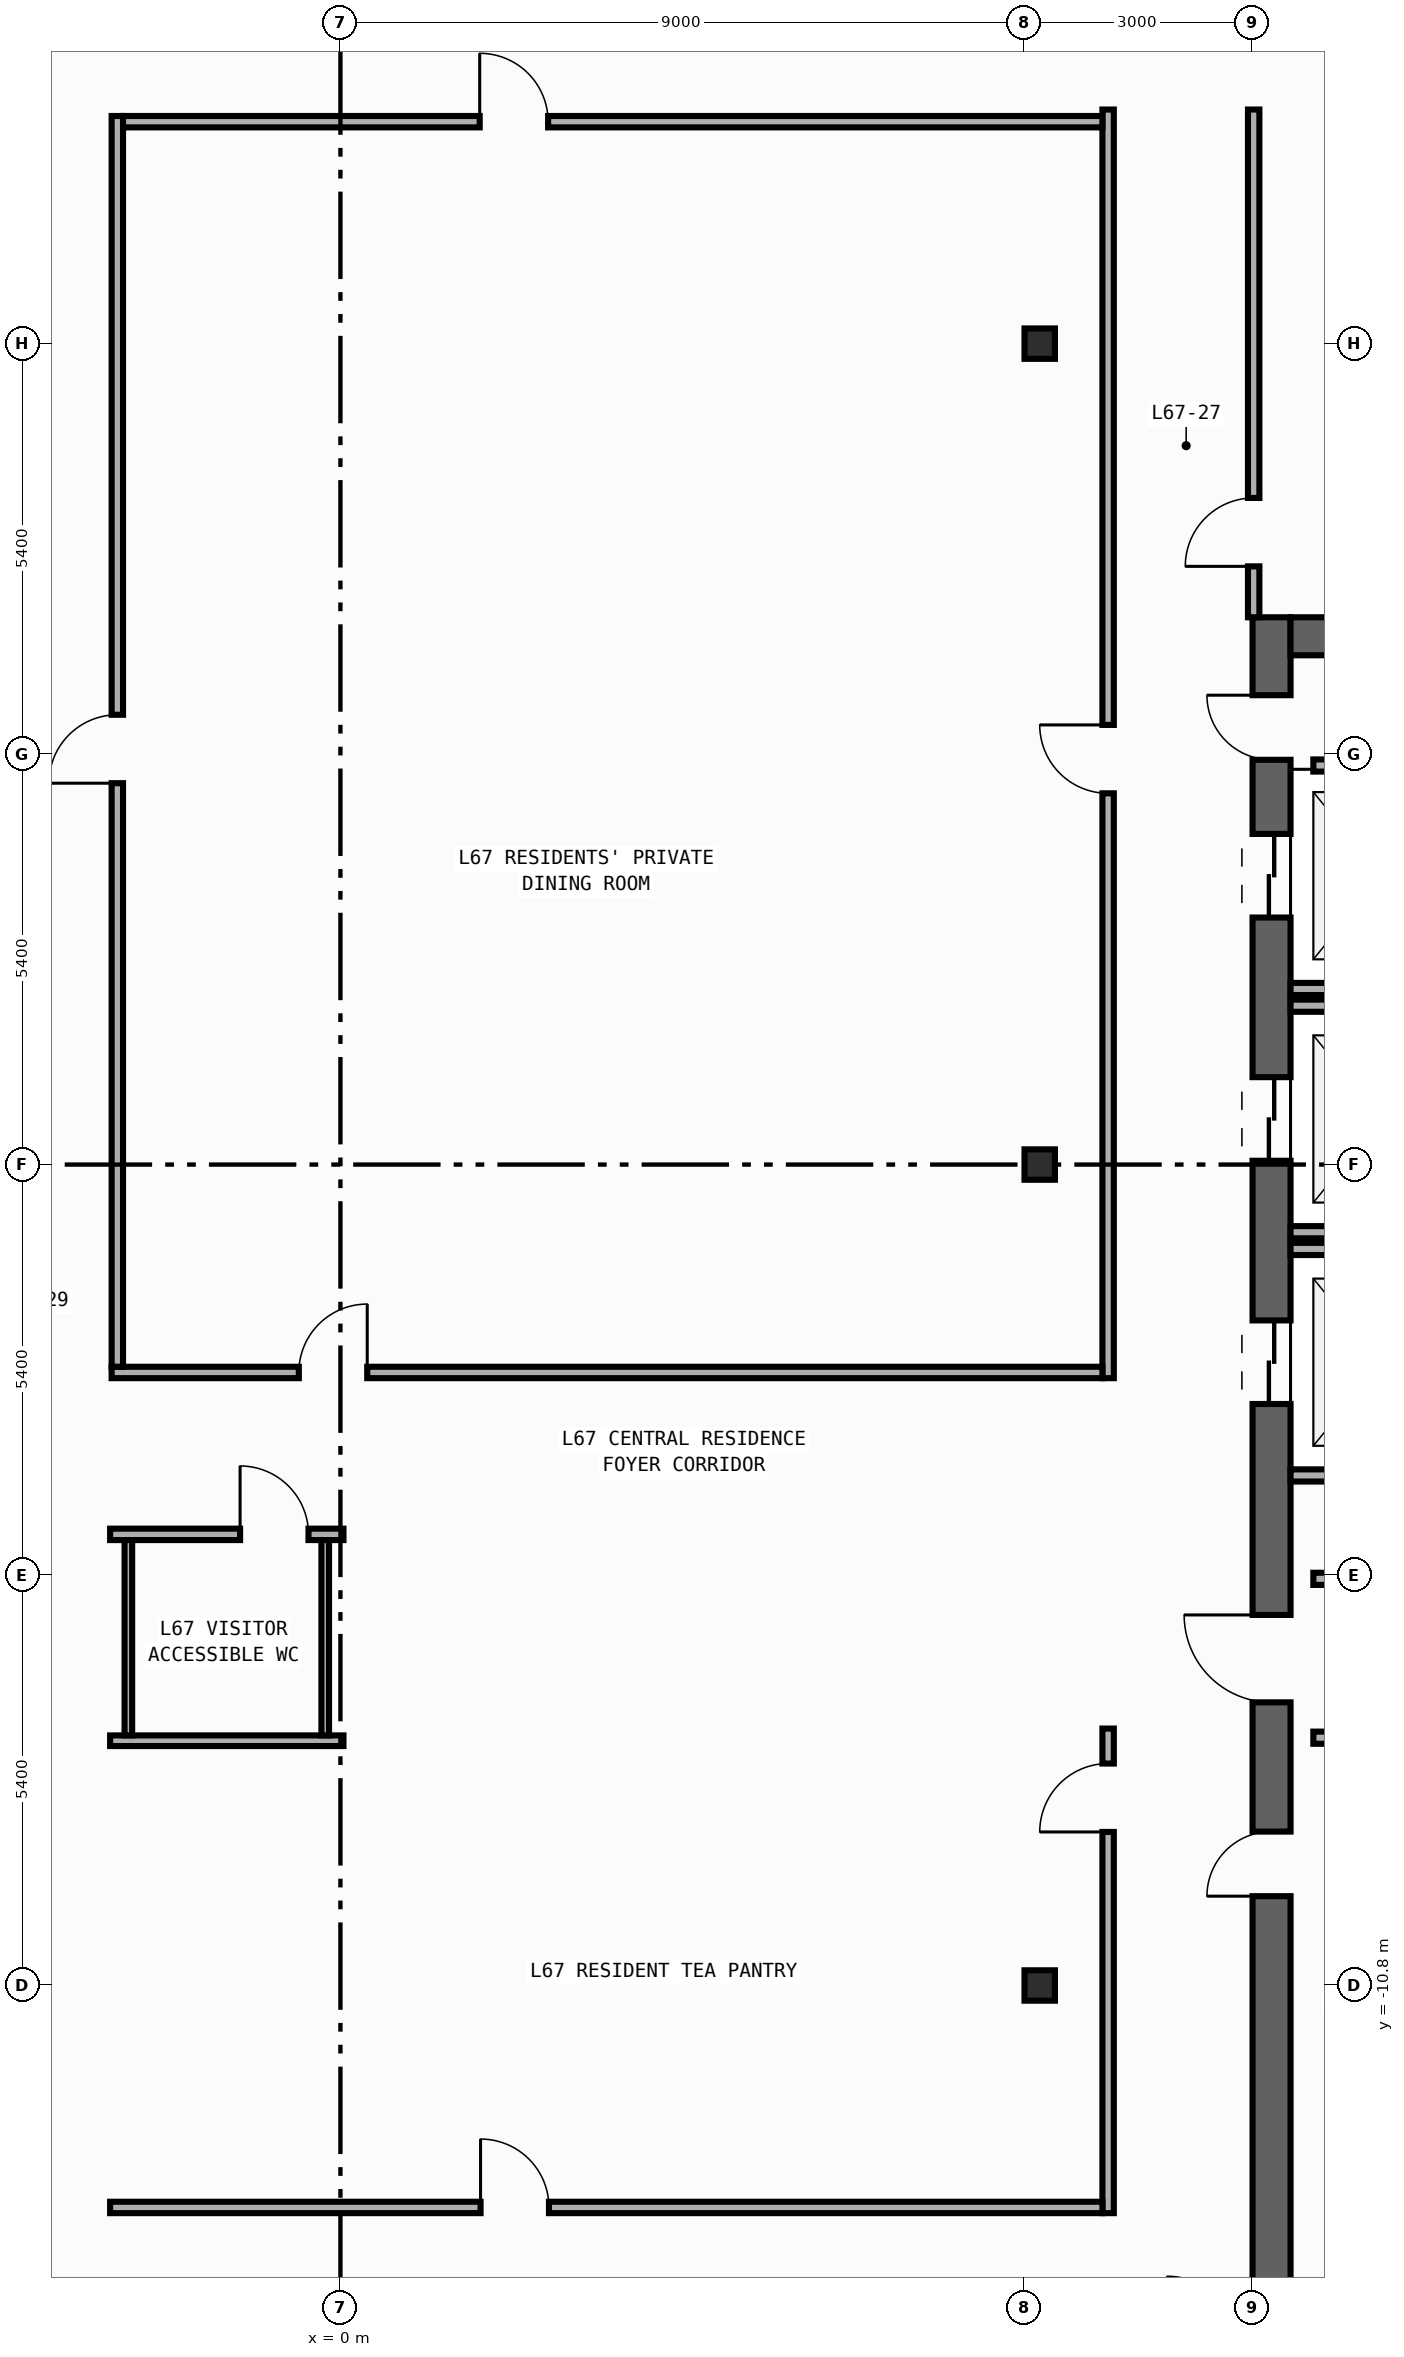
"""IFC4 building model, lengths in metres.
Left out: names, types, materials, properties, quantities, classifications, styles, units other than length and angle.
Written with IfcOpenShell. Run it as: python <this file> out.ifc"""

import sys

from ifc_helpers import new_model, si_unit, direction, frame, frame_2d, origin, origin_2d, place, context, subcontext, project, spatial, rectangle, i_section, extrude, element, fill, save


model = new_model("IFC4")
c1 = context("Model", 3, precision=1e-05, world=origin(), true_north=direction((0.0, 1.0)))
c2 = subcontext(c1, "Body", "Model", "MODEL_VIEW")
j1 = project(units=[si_unit("LENGTHUNIT", "METRE"), si_unit("PLANEANGLEUNIT", "RADIAN")], contexts=[c1])
p1 = place(None, origin())
s1 = spatial("IfcSite", under=j1, at=p1, CompositionType="ELEMENT")
p2 = place(p1, origin())
s2 = spatial("IfcBuilding", under=s1, at=p2, CompositionType="ELEMENT")
p3 = place(p2, frame((0.0, 0.0, 281.4)))
s3 = spatial("IfcBuildingStorey", under=s2, at=p3, CompositionType="ELEMENT", Elevation=281.4)
p4 = place(p3, frame((12.25, -19.8, 0.0), z_axis=(0.0, 0.0, 1.0), x_axis=(0.0, 1.0, 0.0)))
e1 = element("IfcWall", 1, at=p4, inside=s3, PredefinedType="SHEAR", context=c2, shape_type="SweptSolid", body=[
    extrude(rectangle(XDim=27.0, YDim=0.5, at=frame_2d((13.5, 0.0))), origin(), (0.0, 0.0, 1.0), 3.54),
])
p5 = place(p4, frame((23.05, 0.0, 0.0)))
e2 = element("IfcOpeningElement", 2, at=p5, cuts=e1, PredefinedType="OPENING", context=c2, shape_type="SweptSolid", body=[
    extrude(rectangle(XDim=1.1, YDim=2.2, at=frame_2d((0.55, 1.1))), frame((0.0, 0.26, 0.0), z_axis=(0.0, -1.0, 0.0), x_axis=(1.0, 0.0, 0.0)), (0.0, 0.0, 1.0), 0.52),
])
p6 = place(p4, frame((19.85, 0.0, 0.0)))
e3 = element("IfcOpeningElement", 3, at=p6, cuts=e1, PredefinedType="OPENING", context=c2, shape_type="SweptSolid", body=[
    extrude(rectangle(XDim=1.1, YDim=2.2, at=frame_2d((0.55, 1.1))), frame((0.0, 0.26, 0.0), z_axis=(0.0, -1.0, 0.0), x_axis=(1.0, 0.0, 0.0)), (0.0, 0.0, 1.0), 0.52),
])
p7 = place(p4, frame((16.65, 0.0, 0.0)))
e4 = element("IfcOpeningElement", 4, at=p7, cuts=e1, PredefinedType="OPENING", context=c2, shape_type="SweptSolid", body=[
    extrude(rectangle(XDim=1.1, YDim=2.2, at=frame_2d((0.55, 1.1))), frame((0.0, 0.26, 0.0), z_axis=(0.0, -1.0, 0.0), x_axis=(1.0, 0.0, 0.0)), (0.0, 0.0, 1.0), 0.52),
])
p8 = place(p4, frame((10.175, 0.0, 0.0)))
e5 = element("IfcOpeningElement", 5, at=p8, cuts=e1, PredefinedType="OPENING", context=c2, shape_type="SweptSolid", body=[
    extrude(rectangle(XDim=0.85, YDim=2.1, at=frame_2d((0.425, 1.05))), frame((0.0, 0.26, 0.0), z_axis=(0.0, -1.0, 0.0), x_axis=(1.0, 0.0, 0.0)), (0.0, 0.0, 1.0), 0.52),
])
p9 = place(p4, frame((12.725, 0.0, 0.0)))
e6 = element("IfcOpeningElement", 6, at=p9, cuts=e1, PredefinedType="OPENING", context=c2, shape_type="SweptSolid", body=[
    extrude(rectangle(XDim=1.15, YDim=2.2, at=frame_2d((0.575, 1.1))), frame((0.0, 0.26, 0.0), z_axis=(0.0, -1.0, 0.0), x_axis=(1.0, 0.0, 0.0)), (0.0, 0.0, 1.0), 0.52),
])
p10 = place(p4, frame((25.125, 0.0, 0.0)))
e7 = element("IfcOpeningElement", 7, at=p10, cuts=e1, PredefinedType="OPENING", context=c2, shape_type="SweptSolid", body=[
    extrude(rectangle(XDim=0.85, YDim=2.1, at=frame_2d((0.425, 1.05))), frame((0.0, 0.26, 0.0), z_axis=(0.0, -1.0, 0.0), x_axis=(1.0, 0.0, 0.0)), (0.0, 0.0, 1.0), 0.52),
])
p11 = place(p3, frame((12.5, 6.95, 0.0), z_axis=(0.0, 0.0, 1.0), x_axis=(1.0, 0.0, 0.0)))
e8 = element("IfcWall", 8, at=p11, inside=s3, PredefinedType="SHEAR", context=c2, shape_type="SweptSolid", body=[
    extrude(rectangle(XDim=7.4, YDim=0.5, at=frame_2d((3.7, 0.0))), origin(), (0.0, 0.0, 1.0), 3.54),
])
for number, where, z_axis, x_axis in (
    (9, (9.2, -10.8, 0.0), (0.0, 0.0, 1.0), (1.0, 0.0, 0.0)),
    (10, (9.2, 0.0, 0.0), (0.0, 0.0, 1.0), (1.0, 0.0, 0.0)),
    (11, (9.2, 10.8, 0.0), (0.0, 0.0, 1.0), (1.0, 0.0, 0.0)),
):
    element("IfcColumn", number, at=place(p3, frame(where, z_axis=z_axis, x_axis=x_axis)), inside=s3, PredefinedType="COLUMN", context=c2, shape_type="SweptSolid", body=[
        extrude(i_section(OverallWidth=0.4, OverallDepth=0.4, WebThickness=0.013, FlangeThickness=0.021, FilletRadius=0.022, at=origin_2d()), origin(), (0.0, 0.0, 1.0), 3.8),
    ])
for number, where, z_axis, x_axis in (
    (12, (12.5, 2.31, 0.0), (0.0, 0.0, 1.0), (1.0, 0.0, 0.0)),
    (13, (12.5, -0.89, 0.0), (0.0, 0.0, 1.0), (1.0, 0.0, 0.0)),
    (14, (12.5, 2.09, 0.0), (0.0, 0.0, 1.0), (1.0, 0.0, 0.0)),
    (15, (12.5, -4.09, 0.0), (0.0, 0.0, 1.0), (1.0, 0.0, 0.0)),
    (16, (12.5, -1.11, 0.0), (0.0, 0.0, 1.0), (1.0, 0.0, 0.0)),
):
    element("IfcWall", number, at=place(p3, frame(where, z_axis=z_axis, x_axis=x_axis)), inside=s3, PredefinedType="STANDARD", context=c2, shape_type="SweptSolid", body=[
        extrude(rectangle(XDim=2.49, YDim=0.16, at=frame_2d((1.245, 0.0))), origin(), (0.0, 0.0, 1.0), 3.54),
    ])
for number, where, z_axis, x_axis in (
    (17, (12.8, -5.45, 0.0), (0.0, 0.0, 1.0), (1.0, 0.0, 0.0)),
    (18, (12.8, -7.54, 0.0), (0.0, 0.0, 1.0), (1.0, 0.0, 0.0)),
    (19, (12.8, 5.25, 0.0), (0.0, 0.0, 1.0), (1.0, 0.0, 0.0)),
):
    element("IfcWall", number, at=place(p3, frame(where, z_axis=z_axis, x_axis=x_axis)), inside=s3, PredefinedType="STANDARD", context=c2, shape_type="SweptSolid", body=[
        extrude(rectangle(XDim=2.6, YDim=0.16, at=frame_2d((1.3, 0.0))), origin(), (0.0, 0.0, 1.0), 3.54),
    ])
p12 = place(p3, frame((12.015, 7.2, 0.0), z_axis=(0.0, 0.0, 1.0), x_axis=(0.0, 1.0, 0.0)))
e20 = element("IfcWall", 20, at=p12, inside=s3, PredefinedType="PARTITIONING", context=c2, shape_type="SweptSolid", body=[
    extrude(rectangle(XDim=6.68, YDim=0.15, at=frame_2d((3.34, 0.0))), origin(), (0.0, 0.0, 1.0), 3.54),
])
p13 = place(p12, frame((0.67, 0.0, 0.0)))
e21 = element("IfcOpeningElement", 21, at=p13, cuts=e20, PredefinedType="OPENING", context=c2, shape_type="SweptSolid", body=[
    extrude(rectangle(XDim=0.9, YDim=2.15, at=frame_2d((0.45, 1.075))), frame((0.0, 0.085, 0.0), z_axis=(0.0, -1.0, 0.0), x_axis=(1.0, 0.0, 0.0)), (0.0, 0.0, 1.0), 0.17),
])
p14 = place(p3, frame((10.1, -2.81, 0.0), z_axis=(0.0, 0.0, 1.0), x_axis=(0.0, 1.0, 0.0)))
e22 = element("IfcWall", 22, at=p14, inside=s3, PredefinedType="PARTITIONING", context=c2, shape_type="SweptSolid", body=[
    extrude(rectangle(XDim=16.69, YDim=0.15, at=frame_2d((8.345, 0.0))), origin(), (0.0, 0.0, 1.0), 3.54),
])
p15 = place(p14, frame((7.694, 0.0, 0.0)))
e23 = element("IfcOpeningElement", 23, at=p15, cuts=e22, PredefinedType="OPENING", context=c2, shape_type="SweptSolid", body=[
    extrude(rectangle(XDim=0.9, YDim=2.15, at=frame_2d((0.45, 1.075))), frame((0.0, 0.085, 0.0), z_axis=(0.0, -1.0, 0.0), x_axis=(1.0, 0.0, 0.0)), (0.0, 0.0, 1.0), 0.17),
])
p16 = place(p3, frame((10.1, -13.795, 0.0), z_axis=(0.0, 0.0, 1.0), x_axis=(0.0, 1.0, 0.0)))
e24 = element("IfcWall", 24, at=p16, inside=s3, PredefinedType="PARTITIONING", context=c2, shape_type="SweptSolid", body=[
    extrude(rectangle(XDim=6.375, YDim=0.15, at=frame_2d((3.188, 0.0))), origin(), (0.0, 0.0, 1.0), 3.54),
])
p17 = place(p16, frame((5.015, 0.0, 0.0)))
e25 = element("IfcOpeningElement", 25, at=p17, cuts=e24, PredefinedType="OPENING", context=c2, shape_type="SweptSolid", body=[
    extrude(rectangle(XDim=0.9, YDim=2.15, at=frame_2d((0.45, 1.075))), frame((0.0, 0.085, 0.0), z_axis=(0.0, -1.0, 0.0), x_axis=(1.0, 0.0, 0.0)), (0.0, 0.0, 1.0), 0.17),
])
p18 = place(p3, frame((-3.01, -2.735, 0.0), z_axis=(0.0, 0.0, 1.0), x_axis=(1.0, 0.0, 0.0)))
e26 = element("IfcWall", 26, at=p18, inside=s3, PredefinedType="PARTITIONING", context=c2, shape_type="SweptSolid", body=[
    extrude(rectangle(XDim=13.035, YDim=0.15, at=frame_2d((6.518, 0.0))), origin(), (0.0, 0.0, 1.0), 3.54),
])
p19 = place(p18, frame((2.463, 0.0, 0.0)))
e27 = element("IfcOpeningElement", 27, at=p19, cuts=e26, PredefinedType="OPENING", context=c2, shape_type="SweptSolid", body=[
    extrude(rectangle(XDim=0.9, YDim=2.15, at=frame_2d((0.45, 1.075))), frame((0.0, 0.085, 0.0), z_axis=(0.0, -1.0, 0.0), x_axis=(1.0, 0.0, 0.0)), (0.0, 0.0, 1.0), 0.17),
])
p20 = place(p3, frame((-3.03, -4.865, 0.0), z_axis=(0.0, 0.0, 1.0), x_axis=(1.0, 0.0, 0.0)))
e28 = element("IfcWall", 28, at=p20, inside=s3, PredefinedType="PARTITIONING", context=c2, shape_type="SweptSolid", body=[
    extrude(rectangle(XDim=3.07, YDim=0.15, at=frame_2d((1.535, 0.0))), origin(), (0.0, 0.0, 1.0), 3.54),
])
p21 = place(p20, frame((1.71, 0.0, 0.0)))
e29 = element("IfcOpeningElement", 29, at=p21, cuts=e28, PredefinedType="OPENING", context=c2, shape_type="SweptSolid", body=[
    extrude(rectangle(XDim=0.9, YDim=2.15, at=frame_2d((0.45, 1.075))), frame((0.0, 0.085, 0.0), z_axis=(0.0, -1.0, 0.0), x_axis=(1.0, 0.0, 0.0)), (0.0, 0.0, 1.0), 0.17),
])
p22 = place(p3, frame((-2.935, -2.66, 0.0), z_axis=(0.0, 0.0, 1.0), x_axis=(0.0, 1.0, 0.0)))
e30 = element("IfcWall", 30, at=p22, inside=s3, PredefinedType="PARTITIONING", context=c2, shape_type="SweptSolid", body=[
    extrude(rectangle(XDim=16.455, YDim=0.15, at=frame_2d((8.228, 0.0))), origin(), (0.0, 0.0, 1.0), 3.54),
])
p23 = place(p22, frame((7.677, 0.0, 0.0)))
e31 = element("IfcOpeningElement", 31, at=p23, cuts=e30, PredefinedType="OPENING", context=c2, shape_type="SweptSolid", body=[
    extrude(rectangle(XDim=0.9, YDim=2.15, at=frame_2d((0.45, 1.075))), frame((0.0, 0.085, 0.0), z_axis=(0.0, -1.0, 0.0), x_axis=(1.0, 0.0, 0.0)), (0.0, 0.0, 1.0), 0.17),
])
p24 = place(p3, frame((-2.86, 13.72, 0.0), z_axis=(0.0, 0.0, 1.0), x_axis=(1.0, 0.0, 0.0)))
e32 = element("IfcWall", 32, at=p24, inside=s3, PredefinedType="PARTITIONING", context=c2, shape_type="SweptSolid", body=[
    extrude(rectangle(XDim=12.885, YDim=0.15, at=frame_2d((6.442, 0.0))), origin(), (0.0, 0.0, 1.0), 3.54),
])
p25 = place(p24, frame((4.692, 0.0, 0.0)))
e33 = element("IfcOpeningElement", 33, at=p25, cuts=e32, PredefinedType="OPENING", context=c2, shape_type="SweptSolid", body=[
    extrude(rectangle(XDim=0.9, YDim=2.15, at=frame_2d((0.45, 1.075))), frame((0.0, 0.085, 0.0), z_axis=(0.0, -1.0, 0.0), x_axis=(1.0, 0.0, 0.0)), (0.0, 0.0, 1.0), 0.17),
])
p26 = place(p3, frame((-3.03, -13.72, 0.0), z_axis=(0.0, 0.0, 1.0), x_axis=(1.0, 0.0, 0.0)))
e34 = element("IfcWall", 34, at=p26, inside=s3, PredefinedType="PARTITIONING", context=c2, shape_type="SweptSolid", body=[
    extrude(rectangle(XDim=13.055, YDim=0.15, at=frame_2d((6.527, 0.0))), origin(), (0.0, 0.0, 1.0), 3.54),
])
p27 = place(p26, frame((4.874, 0.0, 0.0)))
e35 = element("IfcOpeningElement", 35, at=p27, cuts=e34, PredefinedType="OPENING", context=c2, shape_type="SweptSolid", body=[
    extrude(rectangle(XDim=0.9, YDim=2.15, at=frame_2d((0.45, 1.075))), frame((0.0, 0.085, 0.0), z_axis=(0.0, -1.0, 0.0), x_axis=(1.0, 0.0, 0.0)), (0.0, 0.0, 1.0), 0.17),
])
p28 = place(p3, frame((-3.03, -7.58, 0.0), z_axis=(0.0, 0.0, 1.0), x_axis=(1.0, 0.0, 0.0)))
e36 = element("IfcWall", 36, at=p28, inside=s3, PredefinedType="PARTITIONING", context=c2, shape_type="SweptSolid", body=[
    extrude(rectangle(XDim=3.07, YDim=0.14, at=frame_2d((1.535, 0.0))), origin(), (0.0, 0.0, 1.0), 3.54),
])
for number, where, z_axis, x_axis in (
    (37, (-0.2, -4.94, 0.0), (0.0, 0.0, 1.0), (0.0, -1.0, 0.0)),
    (38, (-2.79, -7.51, 0.0), (0.0, 0.0, 1.0), (0.0, 1.0, 0.0)),
):
    element("IfcWall", number, at=place(p3, frame(where, z_axis=z_axis, x_axis=x_axis)), inside=s3, PredefinedType="PARTITIONING", context=c2, shape_type="SweptSolid", body=[
        extrude(rectangle(XDim=2.57, YDim=0.1, at=frame_2d((1.285, 0.0))), origin(), (0.0, 0.0, 1.0), 3.54),
    ])
p29 = place(p5, origin())
e39 = element("IfcDoor", 39, at=p29, inside=s3, OperationType="DOUBLE_DOOR_SLIDING", PredefinedType="DOOR", context=c2, shape_type="SweptSolid", body=[
    extrude(rectangle(XDim=1.1, YDim=2.2, at=frame_2d((0.55, 1.1))), frame((0.0, 0.025, 0.0), z_axis=(0.0, -1.0, 0.0), x_axis=(1.0, 0.0, 0.0)), (0.0, 0.0, 1.0), 0.05),
])
fill(e2, e39)
p30 = place(p6, origin())
e40 = element("IfcDoor", 40, at=p30, inside=s3, OperationType="DOUBLE_DOOR_SLIDING", PredefinedType="DOOR", context=c2, shape_type="SweptSolid", body=[
    extrude(rectangle(XDim=1.1, YDim=2.2, at=frame_2d((0.55, 1.1))), frame((0.0, 0.025, 0.0), z_axis=(0.0, -1.0, 0.0), x_axis=(1.0, 0.0, 0.0)), (0.0, 0.0, 1.0), 0.05),
])
fill(e3, e40)
p31 = place(p7, origin())
e41 = element("IfcDoor", 41, at=p31, inside=s3, OperationType="DOUBLE_DOOR_SLIDING", PredefinedType="DOOR", context=c2, shape_type="SweptSolid", body=[
    extrude(rectangle(XDim=1.1, YDim=2.2, at=frame_2d((0.55, 1.1))), frame((0.0, 0.025, 0.0), z_axis=(0.0, -1.0, 0.0), x_axis=(1.0, 0.0, 0.0)), (0.0, 0.0, 1.0), 0.05),
])
fill(e4, e41)
p32 = place(p8, origin())
e42 = element("IfcDoor", 42, at=p32, inside=s3, OperationType="SINGLE_SWING_LEFT", PredefinedType="DOOR", context=c2, shape_type="SweptSolid", body=[
    extrude(rectangle(XDim=0.85, YDim=2.1, at=frame_2d((0.425, 1.05))), frame((0.0, 0.025, 0.0), z_axis=(0.0, -1.0, 0.0), x_axis=(1.0, 0.0, 0.0)), (0.0, 0.0, 1.0), 0.05),
])
fill(e5, e42)
p33 = place(p9, origin())
e43 = element("IfcDoor", 43, at=p33, inside=s3, OperationType="SINGLE_SWING_RIGHT", PredefinedType="DOOR", context=c2, shape_type="SweptSolid", body=[
    extrude(rectangle(XDim=1.15, YDim=2.2, at=frame_2d((0.575, 1.1))), frame((0.0, 0.025, 0.0), z_axis=(0.0, -1.0, 0.0), x_axis=(1.0, 0.0, 0.0)), (0.0, 0.0, 1.0), 0.05),
])
fill(e6, e43)
p34 = place(p10, origin())
e44 = element("IfcDoor", 44, at=p34, inside=s3, OperationType="SINGLE_SWING_RIGHT", PredefinedType="DOOR", context=c2, shape_type="SweptSolid", body=[
    extrude(rectangle(XDim=0.85, YDim=2.1, at=frame_2d((0.425, 1.05))), frame((0.0, 0.025, 0.0), z_axis=(0.0, -1.0, 0.0), x_axis=(1.0, 0.0, 0.0)), (0.0, 0.0, 1.0), 0.05),
])
fill(e7, e44)
p35 = place(p13, origin())
e45 = element("IfcDoor", 45, at=p35, inside=s3, OperationType="SINGLE_SWING_LEFT", PredefinedType="DOOR", context=c2, shape_type="SweptSolid", body=[
    extrude(rectangle(XDim=0.9, YDim=2.15, at=frame_2d((0.45, 1.075))), frame((0.0, 0.025, 0.0), z_axis=(0.0, -1.0, 0.0), x_axis=(1.0, 0.0, 0.0)), (0.0, 0.0, 1.0), 0.05),
])
fill(e21, e45)
p36 = place(p15, origin())
e46 = element("IfcDoor", 46, at=p36, inside=s3, OperationType="SINGLE_SWING_RIGHT", PredefinedType="DOOR", context=c2, shape_type="SweptSolid", body=[
    extrude(rectangle(XDim=0.9, YDim=2.15, at=frame_2d((0.45, 1.075))), frame((0.0, 0.025, 0.0), z_axis=(0.0, -1.0, 0.0), x_axis=(1.0, 0.0, 0.0)), (0.0, 0.0, 1.0), 0.05),
])
fill(e23, e46)
p37 = place(p17, origin())
e47 = element("IfcDoor", 47, at=p37, inside=s3, OperationType="SINGLE_SWING_LEFT", PredefinedType="DOOR", context=c2, shape_type="SweptSolid", body=[
    extrude(rectangle(XDim=0.9, YDim=2.15, at=frame_2d((0.45, 1.075))), frame((0.0, 0.025, 0.0), z_axis=(0.0, -1.0, 0.0), x_axis=(1.0, 0.0, 0.0)), (0.0, 0.0, 1.0), 0.05),
])
fill(e25, e47)
p38 = place(p19, origin())
e48 = element("IfcDoor", 48, at=p38, inside=s3, OperationType="SINGLE_SWING_RIGHT", PredefinedType="DOOR", context=c2, shape_type="SweptSolid", body=[
    extrude(rectangle(XDim=0.9, YDim=2.15, at=frame_2d((0.45, 1.075))), frame((0.0, 0.025, 0.0), z_axis=(0.0, -1.0, 0.0), x_axis=(1.0, 0.0, 0.0)), (0.0, 0.0, 1.0), 0.05),
])
fill(e27, e48)
p39 = place(p21, origin())
e49 = element("IfcDoor", 49, at=p39, inside=s3, OperationType="SINGLE_SWING_LEFT", PredefinedType="DOOR", context=c2, shape_type="SweptSolid", body=[
    extrude(rectangle(XDim=0.9, YDim=2.15, at=frame_2d((0.45, 1.075))), frame((0.0, 0.025, 0.0), z_axis=(0.0, -1.0, 0.0), x_axis=(1.0, 0.0, 0.0)), (0.0, 0.0, 1.0), 0.05),
])
fill(e29, e49)
p40 = place(p23, origin())
e50 = element("IfcDoor", 50, at=p40, inside=s3, OperationType="SINGLE_SWING_LEFT", PredefinedType="DOOR", context=c2, shape_type="SweptSolid", body=[
    extrude(rectangle(XDim=0.9, YDim=2.15, at=frame_2d((0.45, 1.075))), frame((0.0, 0.025, 0.0), z_axis=(0.0, -1.0, 0.0), x_axis=(1.0, 0.0, 0.0)), (0.0, 0.0, 1.0), 0.05),
])
fill(e31, e50)
p41 = place(p25, origin())
e51 = element("IfcDoor", 51, at=p41, inside=s3, OperationType="SINGLE_SWING_LEFT", PredefinedType="DOOR", context=c2, shape_type="SweptSolid", body=[
    extrude(rectangle(XDim=0.9, YDim=2.15, at=frame_2d((0.45, 1.075))), frame((0.0, 0.025, 0.0), z_axis=(0.0, -1.0, 0.0), x_axis=(1.0, 0.0, 0.0)), (0.0, 0.0, 1.0), 0.05),
])
fill(e33, e51)
p42 = place(p27, origin())
e52 = element("IfcDoor", 52, at=p42, inside=s3, OperationType="SINGLE_SWING_LEFT", PredefinedType="DOOR", context=c2, shape_type="SweptSolid", body=[
    extrude(rectangle(XDim=0.9, YDim=2.15, at=frame_2d((0.45, 1.075))), frame((0.0, 0.025, 0.0), z_axis=(0.0, -1.0, 0.0), x_axis=(1.0, 0.0, 0.0)), (0.0, 0.0, 1.0), 0.05),
])
fill(e35, e52)
save(model, sys.argv[1])
